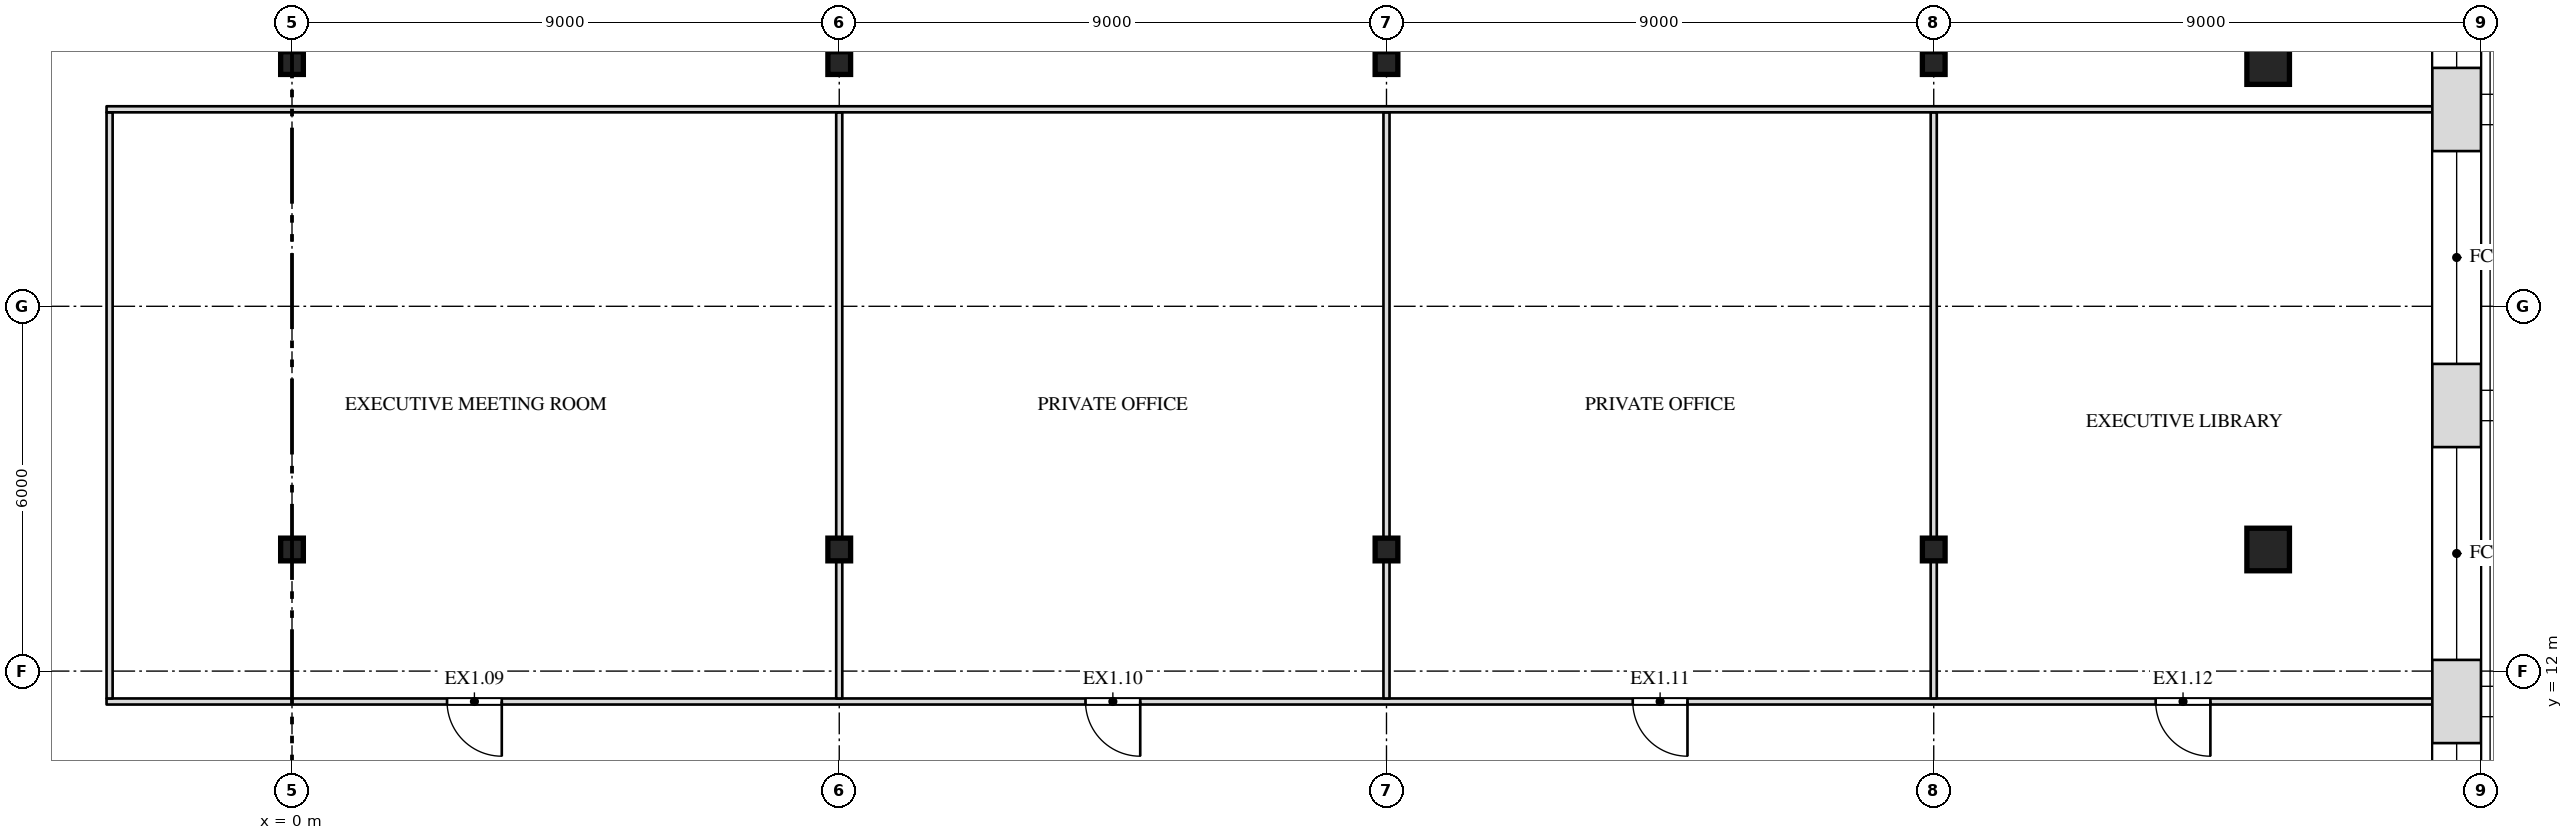
"""IFC4 building model, lengths in metres.
Left out: names, types, materials, properties, quantities, classifications, styles, units other than length and angle.
Written with IfcOpenShell. Run it as: python <this file> out.ifc"""

import sys

from ifc_helpers import new_model, si_unit, direction, frame, frame_2d, origin, origin_2d, place, context, subcontext, project, spatial, rectangle, i_section, extrude, element, fill, save


model = new_model("IFC4")
c1 = context("Model", 3, precision=1e-05, world=origin(), true_north=direction((0.0, 1.0)))
c2 = subcontext(c1, "Body", "Model", "MODEL_VIEW")
j1 = project(units=[si_unit("LENGTHUNIT", "METRE"), si_unit("PLANEANGLEUNIT", "RADIAN")], contexts=[c1])
p1 = place(None, origin())
s1 = spatial("IfcSite", under=j1, at=p1, CompositionType="ELEMENT")
p2 = place(p1, origin())
s2 = spatial("IfcBuilding", under=s1, at=p2, CompositionType="ELEMENT")
p3 = place(p2, frame((0.0, 0.0, 272.5)))
s3 = spatial("IfcBuildingStorey", under=s2, at=p3, CompositionType="ELEMENT", Elevation=272.5)
for number, where, z_axis, x_axis in (
    (1, (0.0, 14.0, 0.0), (0.0, 0.0, 1.0), (1.0, 0.0, 0.0)),
    (2, (9.0, 14.0, 0.0), (0.0, 0.0, 1.0), (1.0, 0.0, 0.0)),
    (3, (18.0, 14.0, 0.0), (0.0, 0.0, 1.0), (1.0, 0.0, 0.0)),
    (4, (27.0, 14.0, 0.0), (0.0, 0.0, 1.0), (1.0, 0.0, 0.0)),
):
    element("IfcColumn", number, at=place(p3, frame(where, z_axis=z_axis, x_axis=x_axis)), inside=s3, PredefinedType="COLUMN", context=c2, shape_type="SweptSolid", body=[
        extrude(i_section(OverallWidth=0.373, OverallDepth=0.373, WebThickness=0.016, FlangeThickness=0.026, at=origin_2d()), origin(), (0.0, 0.0, 1.0), 4.0),
    ])
p4 = place(p3, frame((32.5, 14.0, 0.0), z_axis=(0.0, 0.0, 1.0), x_axis=(1.0, 0.0, 0.0)))
e5 = element("IfcColumn", 5, at=p4, inside=s3, PredefinedType="COLUMN", context=c2, shape_type="SweptSolid", body=[
    extrude(rectangle(XDim=0.7, YDim=0.7, at=origin_2d()), origin(), (0.0, 0.0, 1.0), 4.0),
])
for number, where, z_axis, x_axis in (
    (6, (0.0, 22.0, 0.0), (0.0, 0.0, 1.0), (1.0, 0.0, 0.0)),
    (7, (9.0, 22.0, 0.0), (0.0, 0.0, 1.0), (1.0, 0.0, 0.0)),
    (8, (18.0, 22.0, 0.0), (0.0, 0.0, 1.0), (1.0, 0.0, 0.0)),
    (9, (27.0, 22.0, 0.0), (0.0, 0.0, 1.0), (1.0, 0.0, 0.0)),
):
    element("IfcColumn", number, at=place(p3, frame(where, z_axis=z_axis, x_axis=x_axis)), inside=s3, PredefinedType="COLUMN", context=c2, shape_type="SweptSolid", body=[
        extrude(i_section(OverallWidth=0.373, OverallDepth=0.373, WebThickness=0.016, FlangeThickness=0.026, at=origin_2d()), origin(), (0.0, 0.0, 1.0), 4.0),
    ])
p5 = place(p3, frame((32.5, 22.0, 0.0), z_axis=(0.0, 0.0, 1.0), x_axis=(1.0, 0.0, 0.0)))
e10 = element("IfcColumn", 10, at=p5, inside=s3, PredefinedType="COLUMN", context=c2, shape_type="SweptSolid", body=[
    extrude(rectangle(XDim=0.7, YDim=0.7, at=origin_2d()), origin(), (0.0, 0.0, 1.0), 4.0),
])
p6 = place(p3, frame((-3.05, 11.5, 0.0), z_axis=(0.0, 0.0, 1.0), x_axis=(1.0, 0.0, 0.0)))
e11 = element("IfcWall", 11, at=p6, inside=s3, PredefinedType="PARTITIONING", context=c2, shape_type="SweptSolid", body=[
    extrude(rectangle(XDim=38.25, YDim=0.1, at=frame_2d((19.125, 0.0))), origin(), (0.0, 0.0, 1.0), 3.78),
])
p7 = place(p6, frame((5.6, 0.0, 0.0)))
e12 = element("IfcOpeningElement", 12, at=p7, cuts=e11, PredefinedType="OPENING", context=c2, shape_type="SweptSolid", body=[
    extrude(rectangle(XDim=0.9, YDim=2.1, at=frame_2d((0.45, 1.05))), frame((0.0, 0.062, 0.0), z_axis=(0.0, -1.0, 0.0), x_axis=(1.0, 0.0, 0.0)), (0.0, 0.0, 1.0), 0.124),
])
p8 = place(p6, frame((16.1, 0.0, 0.0)))
e13 = element("IfcOpeningElement", 13, at=p8, cuts=e11, PredefinedType="OPENING", context=c2, shape_type="SweptSolid", body=[
    extrude(rectangle(XDim=0.9, YDim=2.1, at=frame_2d((0.45, 1.05))), frame((0.0, 0.062, 0.0), z_axis=(0.0, -1.0, 0.0), x_axis=(1.0, 0.0, 0.0)), (0.0, 0.0, 1.0), 0.124),
])
p9 = place(p6, frame((25.1, 0.0, 0.0)))
e14 = element("IfcOpeningElement", 14, at=p9, cuts=e11, PredefinedType="OPENING", context=c2, shape_type="SweptSolid", body=[
    extrude(rectangle(XDim=0.9, YDim=2.1, at=frame_2d((0.45, 1.05))), frame((0.0, 0.062, 0.0), z_axis=(0.0, -1.0, 0.0), x_axis=(1.0, 0.0, 0.0)), (0.0, 0.0, 1.0), 0.124),
])
p10 = place(p6, frame((33.7, 0.0, 0.0)))
e15 = element("IfcOpeningElement", 15, at=p10, cuts=e11, PredefinedType="OPENING", context=c2, shape_type="SweptSolid", body=[
    extrude(rectangle(XDim=0.9, YDim=2.1, at=frame_2d((0.45, 1.05))), frame((0.0, 0.062, 0.0), z_axis=(0.0, -1.0, 0.0), x_axis=(1.0, 0.0, 0.0)), (0.0, 0.0, 1.0), 0.124),
])
p11 = place(p3, frame((-3.0, 11.55, 0.0), z_axis=(0.0, 0.0, 1.0), x_axis=(0.0, 1.0, 0.0)))
e16 = element("IfcWall", 16, at=p11, inside=s3, PredefinedType="PARTITIONING", context=c2, shape_type="SweptSolid", body=[
    extrude(rectangle(XDim=9.64, YDim=0.1, at=frame_2d((4.82, 0.0))), origin(), (0.0, 0.0, 1.0), 3.78),
])
p12 = place(p3, frame((9.0, 11.55, 0.0), z_axis=(0.0, 0.0, 1.0), x_axis=(0.0, 1.0, 0.0)))
e17 = element("IfcWall", 17, at=p12, inside=s3, PredefinedType="PARTITIONING", context=c2, shape_type="SweptSolid", body=[
    extrude(rectangle(XDim=2.263, YDim=0.1, at=frame_2d((1.132, 0.0))), origin(), (0.0, 0.0, 1.0), 3.247),
])
p13 = place(p3, frame((9.0, 14.187, 0.0), z_axis=(0.0, 0.0, 1.0), x_axis=(0.0, 1.0, 0.0)))
e18 = element("IfcWall", 18, at=p13, inside=s3, PredefinedType="PARTITIONING", context=c2, shape_type="SweptSolid", body=[
    extrude(rectangle(XDim=7.003, YDim=0.1, at=frame_2d((3.501, 0.0))), origin(), (0.0, 0.0, 1.0), 3.247),
])
p14 = place(p3, frame((18.0, 11.55, 0.0), z_axis=(0.0, 0.0, 1.0), x_axis=(0.0, 1.0, 0.0)))
e19 = element("IfcWall", 19, at=p14, inside=s3, PredefinedType="PARTITIONING", context=c2, shape_type="SweptSolid", body=[
    extrude(rectangle(XDim=2.263, YDim=0.1, at=frame_2d((1.132, 0.0))), origin(), (0.0, 0.0, 1.0), 3.247),
])
p15 = place(p3, frame((18.0, 14.187, 0.0), z_axis=(0.0, 0.0, 1.0), x_axis=(0.0, 1.0, 0.0)))
e20 = element("IfcWall", 20, at=p15, inside=s3, PredefinedType="PARTITIONING", context=c2, shape_type="SweptSolid", body=[
    extrude(rectangle(XDim=7.003, YDim=0.1, at=frame_2d((3.501, 0.0))), origin(), (0.0, 0.0, 1.0), 3.247),
])
p16 = place(p3, frame((27.0, 11.55, 0.0), z_axis=(0.0, 0.0, 1.0), x_axis=(0.0, 1.0, 0.0)))
e21 = element("IfcWall", 21, at=p16, inside=s3, PredefinedType="PARTITIONING", context=c2, shape_type="SweptSolid", body=[
    extrude(rectangle(XDim=2.263, YDim=0.1, at=frame_2d((1.132, 0.0))), origin(), (0.0, 0.0, 1.0), 3.247),
])
p17 = place(p3, frame((27.0, 14.187, 0.0), z_axis=(0.0, 0.0, 1.0), x_axis=(0.0, 1.0, 0.0)))
e22 = element("IfcWall", 22, at=p17, inside=s3, PredefinedType="PARTITIONING", context=c2, shape_type="SweptSolid", body=[
    extrude(rectangle(XDim=7.003, YDim=0.1, at=frame_2d((3.501, 0.0))), origin(), (0.0, 0.0, 1.0), 3.247),
])
p18 = place(p3, frame((-3.05, 21.24, 0.0), z_axis=(0.0, 0.0, 1.0), x_axis=(1.0, 0.0, 0.0)))
e23 = element("IfcWall", 23, at=p18, inside=s3, PredefinedType="PARTITIONING", context=c2, shape_type="SweptSolid", body=[
    extrude(rectangle(XDim=38.25, YDim=0.1, at=frame_2d((19.125, 0.0))), origin(), (0.0, 0.0, 1.0), 3.78),
])
p19 = place(p3, frame((35.6, -7.948, 0.0), z_axis=(0.0, 0.0, 1.0), x_axis=(0.0, 1.0, 0.0)))
e24 = element("IfcWall", 24, at=p19, inside=s3, PredefinedType="SOLIDWALL", context=c2, shape_type="SweptSolid", body=[
    extrude(rectangle(XDim=38.895, YDim=0.8, at=frame_2d((19.448, 0.0))), origin(), (0.0, 0.0, 1.0), 3.78),
])
p20 = place(p19, frame((5.526, 0.0, 1.0)))
e25 = element("IfcOpeningElement", 25, at=p20, cuts=e24, PredefinedType="OPENING", context=c2, shape_type="SweptSolid", body=[
    extrude(rectangle(XDim=3.5, YDim=2.5, at=frame_2d((1.75, 1.25))), frame((0.0, 0.412, 0.0), z_axis=(0.0, -1.0, 0.0), x_axis=(1.0, 0.0, 0.0)), (0.0, 0.0, 1.0), 0.824),
])
p21 = place(p19, frame((10.395, 0.0, 1.0)))
e26 = element("IfcOpeningElement", 26, at=p21, cuts=e24, PredefinedType="OPENING", context=c2, shape_type="SweptSolid", body=[
    extrude(rectangle(XDim=3.5, YDim=2.5, at=frame_2d((1.75, 1.25))), frame((0.0, 0.412, 0.0), z_axis=(0.0, -1.0, 0.0), x_axis=(1.0, 0.0, 0.0)), (0.0, 0.0, 1.0), 0.824),
])
p22 = place(p19, frame((15.263, 0.0, 1.0)))
e27 = element("IfcOpeningElement", 27, at=p22, cuts=e24, PredefinedType="OPENING", context=c2, shape_type="SweptSolid", body=[
    extrude(rectangle(XDim=3.5, YDim=2.5, at=frame_2d((1.75, 1.25))), frame((0.0, 0.412, 0.0), z_axis=(0.0, -1.0, 0.0), x_axis=(1.0, 0.0, 0.0)), (0.0, 0.0, 1.0), 0.824),
])
p23 = place(p19, frame((20.132, 0.0, 1.0)))
e28 = element("IfcOpeningElement", 28, at=p23, cuts=e24, PredefinedType="OPENING", context=c2, shape_type="SweptSolid", body=[
    extrude(rectangle(XDim=3.5, YDim=2.5, at=frame_2d((1.75, 1.25))), frame((0.0, 0.412, 0.0), z_axis=(0.0, -1.0, 0.0), x_axis=(1.0, 0.0, 0.0)), (0.0, 0.0, 1.0), 0.824),
])
p24 = place(p19, frame((25.0, 0.0, 1.0)))
e29 = element("IfcOpeningElement", 29, at=p24, cuts=e24, PredefinedType="OPENING", context=c2, shape_type="SweptSolid", body=[
    extrude(rectangle(XDim=3.5, YDim=2.5, at=frame_2d((1.75, 1.25))), frame((0.0, 0.412, 0.0), z_axis=(0.0, -1.0, 0.0), x_axis=(1.0, 0.0, 0.0)), (0.0, 0.0, 1.0), 0.824),
])
p25 = place(p19, frame((29.869, 0.0, 1.0)))
e30 = element("IfcOpeningElement", 30, at=p25, cuts=e24, PredefinedType="OPENING", context=c2, shape_type="SweptSolid", body=[
    extrude(rectangle(XDim=3.5, YDim=2.5, at=frame_2d((1.75, 1.25))), frame((0.0, 0.412, 0.0), z_axis=(0.0, -1.0, 0.0), x_axis=(1.0, 0.0, 0.0)), (0.0, 0.0, 1.0), 0.824),
])
p26 = place(p7, origin())
e31 = element("IfcDoor", 31, at=p26, inside=s3, OperationType="SINGLE_SWING_LEFT", PredefinedType="DOOR", context=c2, shape_type="SweptSolid", body=[
    extrude(rectangle(XDim=0.9, YDim=2.1, at=frame_2d((0.45, 1.05))), frame((0.0, 0.025, 0.0), z_axis=(0.0, -1.0, 0.0), x_axis=(1.0, 0.0, 0.0)), (0.0, 0.0, 1.0), 0.05),
])
fill(e12, e31)
p27 = place(p8, origin())
e32 = element("IfcDoor", 32, at=p27, inside=s3, OperationType="SINGLE_SWING_LEFT", PredefinedType="DOOR", context=c2, shape_type="SweptSolid", body=[
    extrude(rectangle(XDim=0.9, YDim=2.1, at=frame_2d((0.45, 1.05))), frame((0.0, 0.025, 0.0), z_axis=(0.0, -1.0, 0.0), x_axis=(1.0, 0.0, 0.0)), (0.0, 0.0, 1.0), 0.05),
])
fill(e13, e32)
p28 = place(p9, origin())
e33 = element("IfcDoor", 33, at=p28, inside=s3, OperationType="SINGLE_SWING_LEFT", PredefinedType="DOOR", context=c2, shape_type="SweptSolid", body=[
    extrude(rectangle(XDim=0.9, YDim=2.1, at=frame_2d((0.45, 1.05))), frame((0.0, 0.025, 0.0), z_axis=(0.0, -1.0, 0.0), x_axis=(1.0, 0.0, 0.0)), (0.0, 0.0, 1.0), 0.05),
])
fill(e14, e33)
p29 = place(p10, origin())
e34 = element("IfcDoor", 34, at=p29, inside=s3, OperationType="SINGLE_SWING_LEFT", PredefinedType="DOOR", context=c2, shape_type="SweptSolid", body=[
    extrude(rectangle(XDim=0.9, YDim=2.1, at=frame_2d((0.45, 1.05))), frame((0.0, 0.025, 0.0), z_axis=(0.0, -1.0, 0.0), x_axis=(1.0, 0.0, 0.0)), (0.0, 0.0, 1.0), 0.05),
])
fill(e15, e34)
p30 = place(p22, origin())
e35 = element("IfcWindow", 35, at=p30, inside=s3, PartitioningType="SINGLE_PANEL", PredefinedType="WINDOW", context=c2, shape_type="SweptSolid", body=[
    extrude(rectangle(XDim=3.5, YDim=2.5, at=frame_2d((1.75, 1.25))), frame((0.0, 0.03, 0.0), z_axis=(0.0, -1.0, 0.0), x_axis=(1.0, 0.0, 0.0)), (0.0, 0.0, 1.0), 0.06),
])
fill(e27, e35)
p31 = place(p23, origin())
e36 = element("IfcWindow", 36, at=p31, inside=s3, PartitioningType="SINGLE_PANEL", PredefinedType="WINDOW", context=c2, shape_type="SweptSolid", body=[
    extrude(rectangle(XDim=3.5, YDim=2.5, at=frame_2d((1.75, 1.25))), frame((0.0, 0.03, 0.0), z_axis=(0.0, -1.0, 0.0), x_axis=(1.0, 0.0, 0.0)), (0.0, 0.0, 1.0), 0.06),
])
fill(e28, e36)
p32 = place(p24, origin())
e37 = element("IfcWindow", 37, at=p32, inside=s3, PartitioningType="SINGLE_PANEL", PredefinedType="WINDOW", context=c2, shape_type="SweptSolid", body=[
    extrude(rectangle(XDim=3.5, YDim=2.5, at=frame_2d((1.75, 1.25))), frame((0.0, 0.03, 0.0), z_axis=(0.0, -1.0, 0.0), x_axis=(1.0, 0.0, 0.0)), (0.0, 0.0, 1.0), 0.06),
])
fill(e29, e37)
p33 = place(p25, origin())
e38 = element("IfcWindow", 38, at=p33, inside=s3, PartitioningType="SINGLE_PANEL", PredefinedType="WINDOW", context=c2, shape_type="SweptSolid", body=[
    extrude(rectangle(XDim=3.5, YDim=2.5, at=frame_2d((1.75, 1.25))), frame((0.0, 0.03, 0.0), z_axis=(0.0, -1.0, 0.0), x_axis=(1.0, 0.0, 0.0)), (0.0, 0.0, 1.0), 0.06),
])
fill(e30, e38)
save(model, sys.argv[1])
